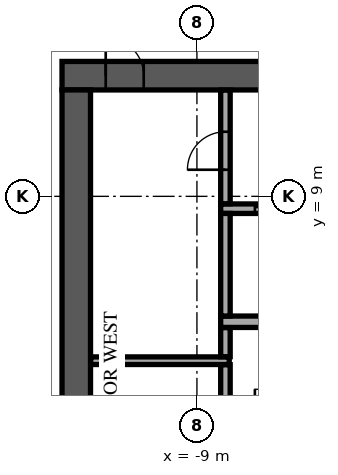
"""IFC4 building model, lengths in metres.
Left out: names, types, materials, properties, quantities, classifications, styles, units other than length and angle.
Written with IfcOpenShell. Run it as: python <this file> out.ifc"""

import sys

from ifc_helpers import new_model, si_unit, direction, frame, frame_2d, origin, place, context, subcontext, project, spatial, rectangle, extrude, element, fill, save


model = new_model("IFC4")
c1 = context("Model", 3, precision=1e-05, world=origin(), true_north=direction((0.0, 1.0)))
c2 = subcontext(c1, "Body", "Model", "MODEL_VIEW")
j1 = project(units=[si_unit("LENGTHUNIT", "METRE"), si_unit("PLANEANGLEUNIT", "RADIAN")], contexts=[c1])
p1 = place(None, origin())
s1 = spatial("IfcSite", under=j1, at=p1, CompositionType="ELEMENT")
p2 = place(p1, origin())
s2 = spatial("IfcBuilding", under=s1, at=p2, CompositionType="ELEMENT")
p3 = place(p2, frame((0.0, 0.0, 274.9)))
s3 = spatial("IfcBuildingStorey", under=s2, at=p3, CompositionType="ELEMENT", Elevation=274.9)
p4 = place(p3, frame((-12.55, 12.175, 0.0), z_axis=(0.0, 0.0, 1.0), x_axis=(1.0, 0.0, 0.0)))
e1 = element("IfcWall", 1, at=p4, inside=s3, PredefinedType="SHEAR", context=c2, shape_type="SweptSolid", body=[
    extrude(rectangle(XDim=25.1, YDim=0.75, at=frame_2d((12.55, 0.0))), origin(), (0.0, 0.0, 1.0), 3.64),
])
p5 = place(p4, frame((11.35, 0.0, 0.0)))
e2 = element("IfcOpeningElement", 2, at=p5, cuts=e1, PredefinedType="OPENING", context=c2, shape_type="SweptSolid", body=[
    extrude(rectangle(XDim=2.4, YDim=2.4, at=frame_2d((1.2, 1.2))), frame((0.0, 0.385, 0.0), z_axis=(0.0, -1.0, 0.0), x_axis=(1.0, 0.0, 0.0)), (0.0, 0.0, 1.0), 0.77),
])
p6 = place(p4, frame((22.175, 0.0, 0.0)))
e3 = element("IfcOpeningElement", 3, at=p6, cuts=e1, PredefinedType="OPENING", context=c2, shape_type="SweptSolid", body=[
    extrude(rectangle(XDim=1.2, YDim=2.1, at=frame_2d((0.6, 1.05))), frame((0.0, 0.385, 0.0), z_axis=(0.0, -1.0, 0.0), x_axis=(1.0, 0.0, 0.0)), (0.0, 0.0, 1.0), 0.77),
])
p7 = place(p4, frame((1.15, 0.0, 0.0)))
e4 = element("IfcOpeningElement", 4, at=p7, cuts=e1, PredefinedType="OPENING", context=c2, shape_type="SweptSolid", body=[
    extrude(rectangle(XDim=1.0, YDim=2.1, at=frame_2d((0.5, 1.05))), frame((0.0, 0.385, 0.0), z_axis=(0.0, -1.0, 0.0), x_axis=(1.0, 0.0, 0.0)), (0.0, 0.0, 1.0), 0.77),
])
p8 = place(p3, frame((-12.175, -11.8, 0.0), z_axis=(0.0, 0.0, 1.0), x_axis=(0.0, 1.0, 0.0)))
e5 = element("IfcWall", 5, at=p8, inside=s3, PredefinedType="SHEAR", context=c2, shape_type="SweptSolid", body=[
    extrude(rectangle(XDim=23.6, YDim=0.75, at=frame_2d((11.8, 0.0))), origin(), (0.0, 0.0, 1.0), 3.64),
])
p9 = place(p8, frame((10.6, 0.0, 0.0)))
e6 = element("IfcOpeningElement", 6, at=p9, cuts=e5, PredefinedType="OPENING", context=c2, shape_type="SweptSolid", body=[
    extrude(rectangle(XDim=2.4, YDim=2.4, at=frame_2d((1.2, 1.2))), frame((0.0, 0.385, 0.0), z_axis=(0.0, -1.0, 0.0), x_axis=(1.0, 0.0, 0.0)), (0.0, 0.0, 1.0), 0.77),
])
p10 = place(p3, frame((-8.375, 5.7, 0.0), z_axis=(0.0, 0.0, 1.0), x_axis=(1.0, 0.0, 0.0)))
e7 = element("IfcWall", 7, at=p10, inside=s3, PredefinedType="SOLIDWALL", context=c2, shape_type="SweptSolid", body=[
    extrude(rectangle(XDim=16.75, YDim=0.3, at=frame_2d((8.375, 0.0))), origin(), (0.0, 0.0, 1.0), 3.64),
])
p11 = place(p3, frame((-8.375, 8.675, 0.0), z_axis=(0.0, 0.0, 1.0), x_axis=(1.0, 0.0, 0.0)))
e8 = element("IfcWall", 8, at=p11, inside=s3, PredefinedType="SOLIDWALL", context=c2, shape_type="SweptSolid", body=[
    extrude(rectangle(XDim=16.75, YDim=0.25, at=frame_2d((8.375, 0.0))), origin(), (0.0, 0.0, 1.0), 3.64),
])
p12 = place(p11, frame((0.9, 0.0, 0.0)))
e9 = element("IfcOpeningElement", 9, at=p12, cuts=e8, PredefinedType="OPENING", context=c2, shape_type="SweptSolid", body=[
    extrude(rectangle(XDim=1.2, YDim=2.1, at=frame_2d((0.6, 1.05))), frame((0.0, 0.135, 0.0), z_axis=(0.0, -1.0, 0.0), x_axis=(1.0, 0.0, 0.0)), (0.0, 0.0, 1.0), 0.27),
])
p13 = place(p11, frame((3.65, 0.0, 0.0)))
e10 = element("IfcOpeningElement", 10, at=p13, cuts=e8, PredefinedType="OPENING", context=c2, shape_type="SweptSolid", body=[
    extrude(rectangle(XDim=1.2, YDim=2.1, at=frame_2d((0.6, 1.05))), frame((0.0, 0.135, 0.0), z_axis=(0.0, -1.0, 0.0), x_axis=(1.0, 0.0, 0.0)), (0.0, 0.0, 1.0), 0.27),
])
p14 = place(p11, frame((6.4, 0.0, 0.0)))
e11 = element("IfcOpeningElement", 11, at=p14, cuts=e8, PredefinedType="OPENING", context=c2, shape_type="SweptSolid", body=[
    extrude(rectangle(XDim=1.2, YDim=2.1, at=frame_2d((0.6, 1.05))), frame((0.0, 0.135, 0.0), z_axis=(0.0, -1.0, 0.0), x_axis=(1.0, 0.0, 0.0)), (0.0, 0.0, 1.0), 0.27),
])
p15 = place(p11, frame((9.15, 0.0, 0.0)))
e12 = element("IfcOpeningElement", 12, at=p15, cuts=e8, PredefinedType="OPENING", context=c2, shape_type="SweptSolid", body=[
    extrude(rectangle(XDim=1.2, YDim=2.1, at=frame_2d((0.6, 1.05))), frame((0.0, 0.135, 0.0), z_axis=(0.0, -1.0, 0.0), x_axis=(1.0, 0.0, 0.0)), (0.0, 0.0, 1.0), 0.27),
])
p16 = place(p11, frame((11.9, 0.0, 0.0)))
e13 = element("IfcOpeningElement", 13, at=p16, cuts=e8, PredefinedType="OPENING", context=c2, shape_type="SweptSolid", body=[
    extrude(rectangle(XDim=1.2, YDim=2.1, at=frame_2d((0.6, 1.05))), frame((0.0, 0.135, 0.0), z_axis=(0.0, -1.0, 0.0), x_axis=(1.0, 0.0, 0.0)), (0.0, 0.0, 1.0), 0.27),
])
p17 = place(p11, frame((14.65, 0.0, 0.0)))
e14 = element("IfcOpeningElement", 14, at=p17, cuts=e8, PredefinedType="OPENING", context=c2, shape_type="SweptSolid", body=[
    extrude(rectangle(XDim=1.2, YDim=2.1, at=frame_2d((0.6, 1.05))), frame((0.0, 0.135, 0.0), z_axis=(0.0, -1.0, 0.0), x_axis=(1.0, 0.0, 0.0)), (0.0, 0.0, 1.0), 0.27),
])
p18 = place(p3, frame((-8.25, 5.85, 0.0), z_axis=(0.0, 0.0, 1.0), x_axis=(0.0, 1.0, 0.0)))
e15 = element("IfcWall", 15, at=p18, inside=s3, PredefinedType="SOLIDWALL", context=c2, shape_type="SweptSolid", body=[
    extrude(rectangle(XDim=2.7, YDim=0.25, at=frame_2d((1.35, 0.0))), origin(), (0.0, 0.0, 1.0), 3.64),
])
p19 = place(p3, frame((-8.25, 2.855, 0.0), z_axis=(0.0, 0.0, 1.0), x_axis=(0.0, 1.0, 0.0)))
e16 = element("IfcWall", 16, at=p19, inside=s3, PredefinedType="PARTITIONING", context=c2, shape_type="SweptSolid", body=[
    extrude(rectangle(XDim=1.715, YDim=0.25, at=frame_2d((0.857, 0.0))), origin(), (0.0, 0.0, 1.0), 3.64),
])
p20 = place(p3, frame((-11.795, 4.675, 0.0), z_axis=(0.0, 0.0, 1.0), x_axis=(1.0, 0.0, 0.0)))
e17 = element("IfcWall", 17, at=p20, inside=s3, PredefinedType="PARTITIONING", context=c2, shape_type="SweptSolid", body=[
    extrude(rectangle(XDim=3.645, YDim=0.2, at=frame_2d((1.823, 0.0))), origin(), (0.0, 0.0, 1.0), 3.64),
])
p21 = place(p3, frame((-8.25, 4.78, 0.0), z_axis=(0.0, 0.0, 1.0), x_axis=(0.0, 1.0, 0.0)))
e18 = element("IfcWall", 18, at=p21, inside=s3, PredefinedType="PARTITIONING", context=c2, shape_type="SweptSolid", body=[
    extrude(rectangle(XDim=0.765, YDim=0.25, at=frame_2d((0.382, 0.0))), origin(), (0.0, 0.0, 1.0), 3.64),
])
p22 = place(p3, frame((-8.25, 8.805, 0.0), z_axis=(0.0, 0.0, 1.0), x_axis=(0.0, 1.0, 0.0)))
e19 = element("IfcWall", 19, at=p22, inside=s3, PredefinedType="PARTITIONING", context=c2, shape_type="SweptSolid", body=[
    extrude(rectangle(XDim=2.99, YDim=0.25, at=frame_2d((1.495, 0.0))), origin(), (0.0, 0.0, 1.0), 3.64),
])
p23 = place(p22, frame((0.895, 0.0, 0.0)))
e20 = element("IfcOpeningElement", 20, at=p23, cuts=e19, PredefinedType="OPENING", context=c2, shape_type="SweptSolid", body=[
    extrude(rectangle(XDim=1.0, YDim=2.1, at=frame_2d((0.5, 1.05))), frame((0.0, 0.135, 0.0), z_axis=(0.0, -1.0, 0.0), x_axis=(1.0, 0.0, 0.0)), (0.0, 0.0, 1.0), 0.27),
])
p24 = place(p3, frame((-9.159, 32.618, 0.0), z_axis=(0.0, 0.0, 1.0), x_axis=(-0.469470468388, -0.88294817476, 0.0)))
e21 = element("IfcWall", 21, at=p24, inside=s3, PredefinedType="STANDARD", context=c2, shape_type="SweptSolid", body=[
    extrude(rectangle(XDim=48.843, YDim=0.6, at=frame_2d((24.422, 0.0))), origin(), (0.0, 0.0, 1.0), 3.64),
])
p25 = place(p24, frame((1.22, 0.0, 0.9)))
e22 = element("IfcOpeningElement", 22, at=p25, cuts=e21, PredefinedType="OPENING", context=c2, shape_type="SweptSolid", body=[
    extrude(rectangle(XDim=2.0, YDim=2.1, at=frame_2d((1.0, 1.05))), frame((0.0, 0.31, 0.0), z_axis=(0.0, -1.0, 0.0), x_axis=(1.0, 0.0, 0.0)), (0.0, 0.0, 1.0), 0.62),
])
p26 = place(p24, frame((5.66, 0.0, 0.9)))
e23 = element("IfcOpeningElement", 23, at=p26, cuts=e21, PredefinedType="OPENING", context=c2, shape_type="SweptSolid", body=[
    extrude(rectangle(XDim=2.0, YDim=2.1, at=frame_2d((1.0, 1.05))), frame((0.0, 0.31, 0.0), z_axis=(0.0, -1.0, 0.0), x_axis=(1.0, 0.0, 0.0)), (0.0, 0.0, 1.0), 0.62),
])
p27 = place(p24, frame((10.101, 0.0, 0.9)))
e24 = element("IfcOpeningElement", 24, at=p27, cuts=e21, PredefinedType="OPENING", context=c2, shape_type="SweptSolid", body=[
    extrude(rectangle(XDim=2.0, YDim=2.1, at=frame_2d((1.0, 1.05))), frame((0.0, 0.31, 0.0), z_axis=(0.0, -1.0, 0.0), x_axis=(1.0, 0.0, 0.0)), (0.0, 0.0, 1.0), 0.62),
])
p28 = place(p24, frame((14.541, 0.0, 0.9)))
e25 = element("IfcOpeningElement", 25, at=p28, cuts=e21, PredefinedType="OPENING", context=c2, shape_type="SweptSolid", body=[
    extrude(rectangle(XDim=2.0, YDim=2.1, at=frame_2d((1.0, 1.05))), frame((0.0, 0.31, 0.0), z_axis=(0.0, -1.0, 0.0), x_axis=(1.0, 0.0, 0.0)), (0.0, 0.0, 1.0), 0.62),
])
p29 = place(p24, frame((18.981, 0.0, 0.9)))
e26 = element("IfcOpeningElement", 26, at=p29, cuts=e21, PredefinedType="OPENING", context=c2, shape_type="SweptSolid", body=[
    extrude(rectangle(XDim=2.0, YDim=2.1, at=frame_2d((1.0, 1.05))), frame((0.0, 0.31, 0.0), z_axis=(0.0, -1.0, 0.0), x_axis=(1.0, 0.0, 0.0)), (0.0, 0.0, 1.0), 0.62),
])
p30 = place(p24, frame((23.422, 0.0, 0.9)))
e27 = element("IfcOpeningElement", 27, at=p30, cuts=e21, PredefinedType="OPENING", context=c2, shape_type="SweptSolid", body=[
    extrude(rectangle(XDim=2.0, YDim=2.1, at=frame_2d((1.0, 1.05))), frame((0.0, 0.31, 0.0), z_axis=(0.0, -1.0, 0.0), x_axis=(1.0, 0.0, 0.0)), (0.0, 0.0, 1.0), 0.62),
])
p31 = place(p24, frame((27.862, 0.0, 0.9)))
e28 = element("IfcOpeningElement", 28, at=p31, cuts=e21, PredefinedType="OPENING", context=c2, shape_type="SweptSolid", body=[
    extrude(rectangle(XDim=2.0, YDim=2.1, at=frame_2d((1.0, 1.05))), frame((0.0, 0.31, 0.0), z_axis=(0.0, -1.0, 0.0), x_axis=(1.0, 0.0, 0.0)), (0.0, 0.0, 1.0), 0.62),
])
p32 = place(p24, frame((32.302, 0.0, 0.9)))
e29 = element("IfcOpeningElement", 29, at=p32, cuts=e21, PredefinedType="OPENING", context=c2, shape_type="SweptSolid", body=[
    extrude(rectangle(XDim=2.0, YDim=2.1, at=frame_2d((1.0, 1.05))), frame((0.0, 0.31, 0.0), z_axis=(0.0, -1.0, 0.0), x_axis=(1.0, 0.0, 0.0)), (0.0, 0.0, 1.0), 0.62),
])
p33 = place(p24, frame((36.742, 0.0, 0.9)))
e30 = element("IfcOpeningElement", 30, at=p33, cuts=e21, PredefinedType="OPENING", context=c2, shape_type="SweptSolid", body=[
    extrude(rectangle(XDim=2.0, YDim=2.1, at=frame_2d((1.0, 1.05))), frame((0.0, 0.31, 0.0), z_axis=(0.0, -1.0, 0.0), x_axis=(1.0, 0.0, 0.0)), (0.0, 0.0, 1.0), 0.62),
])
p34 = place(p24, frame((41.183, 0.0, 0.9)))
e31 = element("IfcOpeningElement", 31, at=p34, cuts=e21, PredefinedType="OPENING", context=c2, shape_type="SweptSolid", body=[
    extrude(rectangle(XDim=2.0, YDim=2.1, at=frame_2d((1.0, 1.05))), frame((0.0, 0.31, 0.0), z_axis=(0.0, -1.0, 0.0), x_axis=(1.0, 0.0, 0.0)), (0.0, 0.0, 1.0), 0.62),
])
p35 = place(p24, frame((45.623, 0.0, 0.9)))
e32 = element("IfcOpeningElement", 32, at=p35, cuts=e21, PredefinedType="OPENING", context=c2, shape_type="SweptSolid", body=[
    extrude(rectangle(XDim=2.0, YDim=2.1, at=frame_2d((1.0, 1.05))), frame((0.0, 0.31, 0.0), z_axis=(0.0, -1.0, 0.0), x_axis=(1.0, 0.0, 0.0)), (0.0, 0.0, 1.0), 0.62),
])
p36 = place(p3, frame((-8.385, 26.033, 0.0), z_axis=(0.0, 0.0, 1.0), x_axis=(0.882949433839, -0.46946810039, 0.0)))
e33 = element("IfcWall", 33, at=p36, inside=s3, PredefinedType="PARTITIONING", context=c2, shape_type="SweptSolid", body=[
    extrude(rectangle(XDim=39.325, YDim=0.15, at=frame_2d((19.662, 0.0))), origin(), (0.0, 0.0, 1.0), 3.04),
])
p37 = place(p36, frame((10.622, 0.0, 0.0)))
e34 = element("IfcOpeningElement", 34, at=p37, cuts=e33, PredefinedType="OPENING", context=c2, shape_type="SweptSolid", body=[
    extrude(rectangle(XDim=1.0, YDim=2.1, at=frame_2d((0.5, 1.05))), frame((0.0, 0.085, 0.0), z_axis=(0.0, -1.0, 0.0), x_axis=(1.0, 0.0, 0.0)), (0.0, 0.0, 1.0), 0.17),
])
p38 = place(p36, frame((16.615, 0.0, 0.0)))
e35 = element("IfcOpeningElement", 35, at=p38, cuts=e33, PredefinedType="OPENING", context=c2, shape_type="SweptSolid", body=[
    extrude(rectangle(XDim=1.0, YDim=2.1, at=frame_2d((0.5, 1.05))), frame((0.0, 0.085, 0.0), z_axis=(0.0, -1.0, 0.0), x_axis=(1.0, 0.0, 0.0)), (0.0, 0.0, 1.0), 0.17),
])
p39 = place(p36, frame((28.254, 0.0, 0.0)))
e36 = element("IfcOpeningElement", 36, at=p39, cuts=e33, PredefinedType="OPENING", context=c2, shape_type="SweptSolid", body=[
    extrude(rectangle(XDim=1.0, YDim=2.1, at=frame_2d((0.5, 1.05))), frame((0.0, 0.085, 0.0), z_axis=(0.0, -1.0, 0.0), x_axis=(1.0, 0.0, 0.0)), (0.0, 0.0, 1.0), 0.17),
])
p40 = place(p7, origin())
e37 = element("IfcDoor", 37, at=p40, inside=s3, OperationType="SINGLE_SWING_LEFT", PredefinedType="DOOR", context=c2, shape_type="SweptSolid", body=[
    extrude(rectangle(XDim=1.0, YDim=2.1, at=frame_2d((0.5, 1.05))), frame((0.0, 0.025, 0.0), z_axis=(0.0, -1.0, 0.0), x_axis=(1.0, 0.0, 0.0)), (0.0, 0.0, 1.0), 0.05),
])
fill(e4, e37)
p41 = place(p12, origin())
e38 = element("IfcDoor", 38, at=p41, inside=s3, OperationType="DOUBLE_DOOR_SLIDING", PredefinedType="DOOR", context=c2, shape_type="SweptSolid", body=[
    extrude(rectangle(XDim=1.2, YDim=2.1, at=frame_2d((0.6, 1.05))), frame((0.0, 0.025, 0.0), z_axis=(0.0, -1.0, 0.0), x_axis=(1.0, 0.0, 0.0)), (0.0, 0.0, 1.0), 0.05),
])
fill(e9, e38)
p42 = place(p23, origin())
e39 = element("IfcDoor", 39, at=p42, inside=s3, OperationType="SINGLE_SWING_RIGHT", PredefinedType="DOOR", context=c2, shape_type="SweptSolid", body=[
    extrude(rectangle(XDim=1.0, YDim=2.1, at=frame_2d((0.5, 1.05))), frame((0.0, 0.025, 0.0), z_axis=(0.0, -1.0, 0.0), x_axis=(1.0, 0.0, 0.0)), (0.0, 0.0, 1.0), 0.05),
])
fill(e20, e39)
save(model, sys.argv[1])
